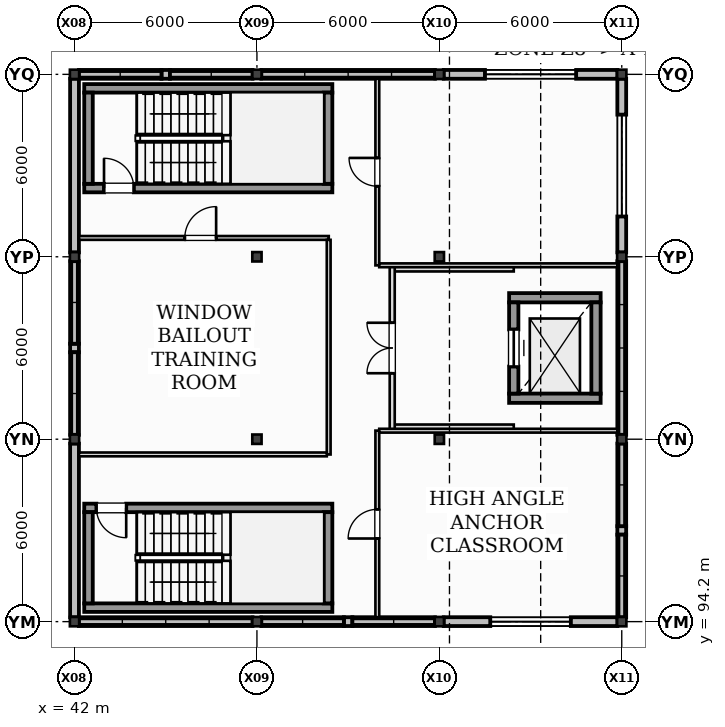
"""IFC4 building model, lengths in metres.
Left out: names, types, materials, properties, quantities, classifications, styles, units other than length and angle.
Written with IfcOpenShell. Run it as: python <this file> out.ifc"""

import sys

from ifc_helpers import new_model, si_unit, direction, frame, frame_2d, origin, origin_2d, place, context, subcontext, project, spatial, rectangle, i_section, extrude, element, fill, save


model = new_model("IFC4")
c1 = context("Model", 3, precision=1e-05, world=origin(), true_north=direction((0.0, 1.0)))
c2 = subcontext(c1, "Body", "Model", "MODEL_VIEW")
j1 = project(units=[si_unit("LENGTHUNIT", "METRE"), si_unit("PLANEANGLEUNIT", "RADIAN")], contexts=[c1])
p1 = place(None, origin())
s1 = spatial("IfcSite", under=j1, at=p1, CompositionType="ELEMENT")
p2 = place(p1, origin())
s2 = spatial("IfcBuilding", under=s1, at=p2, CompositionType="ELEMENT")
p3 = place(p2, frame((0.0, 0.0, 18.0)))
s3 = spatial("IfcBuildingStorey", under=s2, at=p3, CompositionType="ELEMENT", Elevation=18.0)
for number, where, z_axis, x_axis in (
    (1, (42.0, 94.2, 0.0), (0.0, 0.0, 1.0), (1.0, 0.0, 0.0)),
    (2, (42.0, 100.2, 0.0), (0.0, 0.0, 1.0), (1.0, 0.0, 0.0)),
    (3, (42.0, 106.2, 0.0), (0.0, 0.0, 1.0), (1.0, 0.0, 0.0)),
    (4, (42.0, 112.2, 0.0), (0.0, 0.0, 1.0), (1.0, 0.0, 0.0)),
    (5, (48.0, 94.2, 0.0), (0.0, 0.0, 1.0), (1.0, 0.0, 0.0)),
    (6, (48.0, 100.2, 0.0), (0.0, 0.0, 1.0), (1.0, 0.0, 0.0)),
    (7, (48.0, 106.2, 0.0), (0.0, 0.0, 1.0), (1.0, 0.0, 0.0)),
    (8, (48.0, 112.2, 0.0), (0.0, 0.0, 1.0), (1.0, 0.0, 0.0)),
    (9, (54.0, 94.2, 0.0), (0.0, 0.0, 1.0), (1.0, 0.0, 0.0)),
    (10, (54.0, 100.2, 0.0), (0.0, 0.0, 1.0), (1.0, 0.0, 0.0)),
    (11, (54.0, 106.2, 0.0), (0.0, 0.0, 1.0), (1.0, 0.0, 0.0)),
    (12, (54.0, 112.2, 0.0), (0.0, 0.0, 1.0), (1.0, 0.0, 0.0)),
    (13, (60.0, 94.2, 0.0), (0.0, 0.0, 1.0), (1.0, 0.0, 0.0)),
    (14, (60.0, 100.2, 0.0), (0.0, 0.0, 1.0), (1.0, 0.0, 0.0)),
    (15, (60.0, 106.2, 0.0), (0.0, 0.0, 1.0), (1.0, 0.0, 0.0)),
    (16, (60.0, 112.2, 0.0), (0.0, 0.0, 1.0), (1.0, 0.0, 0.0)),
):
    element("IfcColumn", number, at=place(p3, frame(where, z_axis=z_axis, x_axis=x_axis)), inside=s3, PredefinedType="COLUMN", context=c2, shape_type="SweptSolid", body=[
        extrude(i_section(OverallWidth=0.305, OverallDepth=0.308, WebThickness=0.01, FlangeThickness=0.015, at=origin_2d()), origin(), (0.0, 0.0, 1.0), 3.6),
    ])
p4 = place(p3, frame((42.145, 94.2, 0.0), z_axis=(0.0, 0.0, 1.0), x_axis=(1.0, 0.0, 0.0)))
e17 = element("IfcWall", 17, at=p4, inside=s3, PredefinedType="STANDARD", context=c2, shape_type="SweptSolid", body=[
    extrude(rectangle(XDim=5.71, YDim=0.29, at=frame_2d((2.855, 0.0))), origin(), (0.0, 0.0, 1.0), 0.44),
])
p5 = place(p3, frame((50.86, 94.2, 0.0), z_axis=(0.0, 0.0, 1.0), x_axis=(1.0, 0.0, 0.0)))
e18 = element("IfcWall", 18, at=p5, inside=s3, PredefinedType="STANDARD", context=c2, shape_type="SweptSolid", body=[
    extrude(rectangle(XDim=0.28, YDim=0.29, at=frame_2d((0.14, 0.0))), origin(), (0.0, 0.0, 1.0), 2.869),
])
p6 = place(p3, frame((48.145, 94.2, 0.0), z_axis=(0.0, 0.0, 1.0), x_axis=(1.0, 0.0, 0.0)))
e19 = element("IfcWall", 19, at=p6, inside=s3, PredefinedType="STANDARD", context=c2, shape_type="SweptSolid", body=[
    extrude(rectangle(XDim=2.715, YDim=0.29, at=frame_2d((1.357, 0.0))), origin(), (0.0, 0.0, 1.0), 0.56),
])
p7 = place(p3, frame((51.14, 94.2, 0.0), z_axis=(0.0, 0.0, 1.0), x_axis=(1.0, 0.0, 0.0)))
e20 = element("IfcWall", 20, at=p7, inside=s3, PredefinedType="STANDARD", context=c2, shape_type="SweptSolid", body=[
    extrude(rectangle(XDim=2.715, YDim=0.29, at=frame_2d((1.357, 0.0))), origin(), (0.0, 0.0, 1.0), 0.68),
])
p8 = place(p3, frame((54.145, 94.2, 0.0), z_axis=(0.0, 0.0, 1.0), x_axis=(1.0, 0.0, 0.0)))
e21 = element("IfcWall", 21, at=p8, inside=s3, PredefinedType="STANDARD", context=c2, shape_type="SweptSolid", body=[
    extrude(rectangle(XDim=5.71, YDim=0.29, at=frame_2d((2.855, 0.0))), origin(), (0.0, 0.0, 1.0), 2.869),
])
p9 = place(p8, frame((1.53, 0.0, 1.0)))
e22 = element("IfcOpeningElement", 22, at=p9, cuts=e21, PredefinedType="OPENING", context=c2, shape_type="SweptSolid", body=[
    extrude(rectangle(XDim=2.65, YDim=0.88, at=frame_2d((1.325, 0.44))), frame((0.0, 0.155, 0.0), z_axis=(0.0, -1.0, 0.0), x_axis=(1.0, 0.0, 0.0)), (0.0, 0.0, 1.0), 0.31),
])
p10 = place(p3, frame((45.14, 112.2, 0.0), z_axis=(0.0, 0.0, 1.0), x_axis=(-1.0, 0.0, 0.0)))
e23 = element("IfcWall", 23, at=p10, inside=s3, PredefinedType="STANDARD", context=c2, shape_type="SweptSolid", body=[
    extrude(rectangle(XDim=0.28, YDim=0.29, at=frame_2d((0.14, 0.0))), origin(), (0.0, 0.0, 1.0), 2.869),
])
p11 = place(p3, frame((47.855, 112.2, 0.0), z_axis=(0.0, 0.0, 1.0), x_axis=(-1.0, 0.0, 0.0)))
e24 = element("IfcWall", 24, at=p11, inside=s3, PredefinedType="STANDARD", context=c2, shape_type="SweptSolid", body=[
    extrude(rectangle(XDim=2.715, YDim=0.29, at=frame_2d((1.357, 0.0))), origin(), (0.0, 0.0, 1.0), 0.8),
])
p12 = place(p3, frame((44.86, 112.2, 0.0), z_axis=(0.0, 0.0, 1.0), x_axis=(-1.0, 0.0, 0.0)))
e25 = element("IfcWall", 25, at=p12, inside=s3, PredefinedType="STANDARD", context=c2, shape_type="SweptSolid", body=[
    extrude(rectangle(XDim=2.715, YDim=0.29, at=frame_2d((1.357, 0.0))), origin(), (0.0, 0.0, 1.0), 0.92),
])
p13 = place(p3, frame((53.855, 112.2, 0.0), z_axis=(0.0, 0.0, 1.0), x_axis=(-1.0, 0.0, 0.0)))
e26 = element("IfcWall", 26, at=p13, inside=s3, PredefinedType="STANDARD", context=c2, shape_type="SweptSolid", body=[
    extrude(rectangle(XDim=5.71, YDim=0.29, at=frame_2d((2.855, 0.0))), origin(), (0.0, 0.0, 1.0), 0.32),
])
p14 = place(p3, frame((59.855, 112.2, 0.0), z_axis=(0.0, 0.0, 1.0), x_axis=(-1.0, 0.0, 0.0)))
e27 = element("IfcWall", 27, at=p14, inside=s3, PredefinedType="STANDARD", context=c2, shape_type="SweptSolid", body=[
    extrude(rectangle(XDim=5.71, YDim=0.29, at=frame_2d((2.855, 0.0))), origin(), (0.0, 0.0, 1.0), 2.869),
])
p15 = place(p14, frame((1.355, 0.0, 1.0)))
e28 = element("IfcOpeningElement", 28, at=p15, cuts=e27, PredefinedType="OPENING", context=c2, shape_type="SweptSolid", body=[
    extrude(rectangle(XDim=3.0, YDim=0.88, at=frame_2d((1.5, 0.44))), frame((0.0, 0.155, 0.0), z_axis=(0.0, -1.0, 0.0), x_axis=(1.0, 0.0, 0.0)), (0.0, 0.0, 1.0), 0.31),
])
p16 = place(p3, frame((42.0, 100.055, 0.0), z_axis=(0.0, 0.0, 1.0), x_axis=(0.0, -1.0, 0.0)))
e29 = element("IfcWall", 29, at=p16, inside=s3, PredefinedType="STANDARD", context=c2, shape_type="SweptSolid", body=[
    extrude(rectangle(XDim=5.71, YDim=0.29, at=frame_2d((2.855, 0.0))), origin(), (0.0, 0.0, 1.0), 2.873),
])
p17 = place(p3, frame((42.0, 103.34, 0.0), z_axis=(0.0, 0.0, 1.0), x_axis=(0.0, -1.0, 0.0)))
e30 = element("IfcWall", 30, at=p17, inside=s3, PredefinedType="STANDARD", context=c2, shape_type="SweptSolid", body=[
    extrude(rectangle(XDim=0.28, YDim=0.29, at=frame_2d((0.14, 0.0))), origin(), (0.0, 0.0, 1.0), 2.873),
])
p18 = place(p3, frame((42.0, 106.055, 0.0), z_axis=(0.0, 0.0, 1.0), x_axis=(0.0, -1.0, 0.0)))
e31 = element("IfcWall", 31, at=p18, inside=s3, PredefinedType="STANDARD", context=c2, shape_type="SweptSolid", body=[
    extrude(rectangle(XDim=2.715, YDim=0.29, at=frame_2d((1.357, 0.0))), origin(), (0.0, 0.0, 1.0), 0.44),
])
p19 = place(p3, frame((42.0, 103.06, 0.0), z_axis=(0.0, 0.0, 1.0), x_axis=(0.0, -1.0, 0.0)))
e32 = element("IfcWall", 32, at=p19, inside=s3, PredefinedType="STANDARD", context=c2, shape_type="SweptSolid", body=[
    extrude(rectangle(XDim=2.715, YDim=0.29, at=frame_2d((1.357, 0.0))), origin(), (0.0, 0.0, 1.0), 0.56),
])
p20 = place(p3, frame((42.0, 112.055, 0.0), z_axis=(0.0, 0.0, 1.0), x_axis=(0.0, -1.0, 0.0)))
e33 = element("IfcWall", 33, at=p20, inside=s3, PredefinedType="STANDARD", context=c2, shape_type="SweptSolid", body=[
    extrude(rectangle(XDim=5.71, YDim=0.29, at=frame_2d((2.855, 0.0))), origin(), (0.0, 0.0, 1.0), 2.873),
])
p21 = place(p3, frame((60.0, 97.06, 0.0), z_axis=(0.0, 0.0, 1.0), x_axis=(0.0, 1.0, 0.0)))
e34 = element("IfcWall", 34, at=p21, inside=s3, PredefinedType="STANDARD", context=c2, shape_type="SweptSolid", body=[
    extrude(rectangle(XDim=0.28, YDim=0.29, at=frame_2d((0.14, 0.0))), origin(), (0.0, 0.0, 1.0), 2.873),
])
p22 = place(p3, frame((60.0, 94.345, 0.0), z_axis=(0.0, 0.0, 1.0), x_axis=(0.0, 1.0, 0.0)))
e35 = element("IfcWall", 35, at=p22, inside=s3, PredefinedType="STANDARD", context=c2, shape_type="SweptSolid", body=[
    extrude(rectangle(XDim=2.715, YDim=0.29, at=frame_2d((1.357, 0.0))), origin(), (0.0, 0.0, 1.0), 0.68),
])
p23 = place(p3, frame((60.0, 97.34, 0.0), z_axis=(0.0, 0.0, 1.0), x_axis=(0.0, 1.0, 0.0)))
e36 = element("IfcWall", 36, at=p23, inside=s3, PredefinedType="STANDARD", context=c2, shape_type="SweptSolid", body=[
    extrude(rectangle(XDim=2.715, YDim=0.29, at=frame_2d((1.357, 0.0))), origin(), (0.0, 0.0, 1.0), 0.8),
])
p24 = place(p3, frame((60.0, 100.345, 0.0), z_axis=(0.0, 0.0, 1.0), x_axis=(0.0, 1.0, 0.0)))
e37 = element("IfcWall", 37, at=p24, inside=s3, PredefinedType="STANDARD", context=c2, shape_type="SweptSolid", body=[
    extrude(rectangle(XDim=5.71, YDim=0.29, at=frame_2d((2.855, 0.0))), origin(), (0.0, 0.0, 1.0), 0.92),
])
p25 = place(p3, frame((60.0, 106.345, 0.0), z_axis=(0.0, 0.0, 1.0), x_axis=(0.0, 1.0, 0.0)))
e38 = element("IfcWall", 38, at=p25, inside=s3, PredefinedType="STANDARD", context=c2, shape_type="SweptSolid", body=[
    extrude(rectangle(XDim=5.71, YDim=0.29, at=frame_2d((2.855, 0.0))), origin(), (0.0, 0.0, 1.0), 2.873),
])
p26 = place(p25, frame((1.18, 0.0, 1.0)))
e39 = element("IfcOpeningElement", 39, at=p26, cuts=e38, PredefinedType="OPENING", context=c2, shape_type="SweptSolid", body=[
    extrude(rectangle(XDim=3.35, YDim=0.88, at=frame_2d((1.675, 0.44))), frame((0.0, 0.155, 0.0), z_axis=(0.0, -1.0, 0.0), x_axis=(1.0, 0.0, 0.0)), (0.0, 0.0, 1.0), 0.31),
])
p27 = place(p3, frame((42.32, 94.66, 0.0), z_axis=(0.0, 0.0, 1.0), x_axis=(1.0, 0.0, 0.0)))
e40 = element("IfcWall", 40, at=p27, inside=s3, PredefinedType="SHEAR", context=c2, shape_type="SweptSolid", body=[
    extrude(rectangle(XDim=8.16, YDim=0.28, at=frame_2d((4.08, 0.0))), origin(), (0.0, 0.0, 1.0), 3.6),
])
p28 = place(p3, frame((50.48, 97.94, 0.0), z_axis=(0.0, 0.0, 1.0), x_axis=(-1.0, 0.0, 0.0)))
e41 = element("IfcWall", 41, at=p28, inside=s3, PredefinedType="SHEAR", context=c2, shape_type="SweptSolid", body=[
    extrude(rectangle(XDim=8.16, YDim=0.28, at=frame_2d((4.08, 0.0))), origin(), (0.0, 0.0, 1.0), 3.6),
])
p29 = place(p28, frame((6.78, 0.0, 0.0)))
e42 = element("IfcOpeningElement", 42, at=p29, cuts=e41, PredefinedType="OPENING", context=c2, shape_type="SweptSolid", body=[
    extrude(rectangle(XDim=0.98, YDim=2.15, at=frame_2d((0.49, 1.075))), frame((0.0, 0.15, 0.0), z_axis=(0.0, -1.0, 0.0), x_axis=(1.0, 0.0, 0.0)), (0.0, 0.0, 1.0), 0.3),
])
for number, where, z_axis, x_axis in (
    (43, (42.46, 97.8, 0.0), (0.0, 0.0, 1.0), (0.0, -1.0, 0.0)),
    (44, (50.34, 94.8, 0.0), (0.0, 0.0, 1.0), (0.0, 1.0, 0.0)),
):
    element("IfcWall", number, at=place(p3, frame(where, z_axis=z_axis, x_axis=x_axis)), inside=s3, PredefinedType="SHEAR", context=c2, shape_type="SweptSolid", body=[
        extrude(rectangle(XDim=3.0, YDim=0.28, at=frame_2d((1.5, 0.0))), origin(), (0.0, 0.0, 1.0), 3.6),
    ])
p30 = place(p3, frame((42.32, 108.46, 0.0), z_axis=(0.0, 0.0, 1.0), x_axis=(1.0, 0.0, 0.0)))
e45 = element("IfcWall", 45, at=p30, inside=s3, PredefinedType="SHEAR", context=c2, shape_type="SweptSolid", body=[
    extrude(rectangle(XDim=8.16, YDim=0.28, at=frame_2d((4.08, 0.0))), origin(), (0.0, 0.0, 1.0), 3.6),
])
p31 = place(p30, frame((0.65, 0.0, 0.0)))
e46 = element("IfcOpeningElement", 46, at=p31, cuts=e45, PredefinedType="OPENING", context=c2, shape_type="SweptSolid", body=[
    extrude(rectangle(XDim=0.98, YDim=2.15, at=frame_2d((0.49, 1.075))), frame((0.0, 0.15, 0.0), z_axis=(0.0, -1.0, 0.0), x_axis=(1.0, 0.0, 0.0)), (0.0, 0.0, 1.0), 0.3),
])
p32 = place(p3, frame((50.48, 111.74, 0.0), z_axis=(0.0, 0.0, 1.0), x_axis=(-1.0, 0.0, 0.0)))
e47 = element("IfcWall", 47, at=p32, inside=s3, PredefinedType="SHEAR", context=c2, shape_type="SweptSolid", body=[
    extrude(rectangle(XDim=8.16, YDim=0.28, at=frame_2d((4.08, 0.0))), origin(), (0.0, 0.0, 1.0), 3.6),
])
for number, where, z_axis, x_axis in (
    (48, (42.46, 111.6, 0.0), (0.0, 0.0, 1.0), (0.0, -1.0, 0.0)),
    (49, (50.34, 108.6, 0.0), (0.0, 0.0, 1.0), (0.0, 1.0, 0.0)),
):
    element("IfcWall", number, at=place(p3, frame(where, z_axis=z_axis, x_axis=x_axis)), inside=s3, PredefinedType="SHEAR", context=c2, shape_type="SweptSolid", body=[
        extrude(rectangle(XDim=3.0, YDim=0.28, at=frame_2d((1.5, 0.0))), origin(), (0.0, 0.0, 1.0), 3.6),
    ])
for number, where, z_axis, x_axis in (
    (50, (56.295, 101.548, 0.0), (0.0, 0.0, 1.0), (1.0, 0.0, 0.0)),
    (51, (59.305, 104.853, 0.0), (0.0, 0.0, 1.0), (-1.0, 0.0, 0.0)),
):
    element("IfcWall", number, at=place(p3, frame(where, z_axis=z_axis, x_axis=x_axis)), inside=s3, PredefinedType="SHEAR", context=c2, shape_type="SweptSolid", body=[
        extrude(rectangle(XDim=3.01, YDim=0.305, at=frame_2d((1.505, 0.0))), origin(), (0.0, 0.0, 1.0), 3.6),
    ])
p33 = place(p3, frame((56.448, 104.7, 0.0), z_axis=(0.0, 0.0, 1.0), x_axis=(0.0, -1.0, 0.0)))
e52 = element("IfcWall", 52, at=p33, inside=s3, PredefinedType="SHEAR", context=c2, shape_type="SweptSolid", body=[
    extrude(rectangle(XDim=3.0, YDim=0.305, at=frame_2d((1.5, 0.0))), origin(), (0.0, 0.0, 1.0), 3.6),
])
p34 = place(p33, frame((0.89, 0.0, 0.0)))
e53 = element("IfcOpeningElement", 53, at=p34, cuts=e52, PredefinedType="OPENING", context=c2, shape_type="SweptSolid", body=[
    extrude(rectangle(XDim=1.22, YDim=2.22, at=frame_2d((0.61, 1.11))), frame((0.0, 0.162, 0.0), z_axis=(0.0, -1.0, 0.0), x_axis=(1.0, 0.0, 0.0)), (0.0, 0.0, 1.0), 0.325),
])
p35 = place(p3, frame((59.153, 101.7, 0.0), z_axis=(0.0, 0.0, 1.0), x_axis=(0.0, 1.0, 0.0)))
e54 = element("IfcWall", 54, at=p35, inside=s3, PredefinedType="SHEAR", context=c2, shape_type="SweptSolid", body=[
    extrude(rectangle(XDim=3.0, YDim=0.305, at=frame_2d((1.5, 0.0))), origin(), (0.0, 0.0, 1.0), 3.6),
])
for number, where, z_axis, x_axis in (
    (55, (52.45, 100.6, 0.0), (0.0, 0.0, 1.0), (1.0, 0.0, 0.0)),
    (56, (56.448, 105.8, 0.0), (0.0, 0.0, 1.0), (-1.0, 0.0, 0.0)),
):
    element("IfcWall", number, at=place(p3, frame(where, z_axis=z_axis, x_axis=x_axis)), inside=s3, PredefinedType="PARTITIONING", context=c2, shape_type="SweptSolid", body=[
        extrude(rectangle(XDim=3.998, YDim=0.165, at=frame_2d((1.999, 0.0))), origin(), (0.0, 0.0, 1.0), 3.36),
    ])
p36 = place(p3, frame((52.45, 100.52, 0.0), z_axis=(0.0, 0.0, 1.0), x_axis=(0.0, 1.0, 0.0)))
e57 = element("IfcWall", 57, at=p36, inside=s3, PredefinedType="PARTITIONING", context=c2, shape_type="SweptSolid", body=[
    extrude(rectangle(XDim=5.36, YDim=0.165, at=frame_2d((2.68, 0.0))), origin(), (0.0, 0.0, 1.0), 3.36),
])
p37 = place(p36, frame((1.85, 0.0, 0.0)))
e58 = element("IfcOpeningElement", 58, at=p37, cuts=e57, PredefinedType="OPENING", context=c2, shape_type="SweptSolid", body=[
    extrude(rectangle(XDim=1.66, YDim=2.2, at=frame_2d((0.83, 1.1))), frame((0.0, 0.093, 0.0), z_axis=(0.0, -1.0, 0.0), x_axis=(1.0, 0.0, 0.0)), (0.0, 0.0, 1.0), 0.185),
])
p38 = place(p3, frame((42.145, 106.82, 0.0), z_axis=(0.0, 0.0, 1.0), x_axis=(1.0, 0.0, 0.0)))
e59 = element("IfcWall", 59, at=p38, inside=s3, PredefinedType="PARTITIONING", context=c2, shape_type="SweptSolid", body=[
    extrude(rectangle(XDim=8.218, YDim=0.125, at=frame_2d((4.109, 0.0))), origin(), (0.0, 0.0, 1.0), 3.36),
])
p39 = place(p38, frame((3.483, 0.0, 0.0)))
e60 = element("IfcOpeningElement", 60, at=p39, cuts=e59, PredefinedType="OPENING", context=c2, shape_type="SweptSolid", body=[
    extrude(rectangle(XDim=1.03, YDim=2.15, at=frame_2d((0.515, 1.075))), frame((0.0, 0.073, 0.0), z_axis=(0.0, -1.0, 0.0), x_axis=(1.0, 0.0, 0.0)), (0.0, 0.0, 1.0), 0.145),
])
p40 = place(p3, frame((50.36, 106.758, 0.0), z_axis=(0.0, 0.0, 1.0), x_axis=(0.0, -1.0, 0.0)))
e61 = element("IfcWall", 61, at=p40, inside=s3, PredefinedType="PARTITIONING", context=c2, shape_type="SweptSolid", body=[
    extrude(rectangle(XDim=7.06, YDim=0.125, at=frame_2d((3.53, 0.0))), origin(), (0.0, 0.0, 1.0), 3.36),
])
p41 = place(p3, frame((50.298, 99.7, 0.0), z_axis=(0.0, 0.0, 1.0), x_axis=(-1.0, 0.0, 0.0)))
e62 = element("IfcWall", 62, at=p41, inside=s3, PredefinedType="PARTITIONING", context=c2, shape_type="SweptSolid", body=[
    extrude(rectangle(XDim=8.153, YDim=0.125, at=frame_2d((4.076, 0.0))), origin(), (0.0, 0.0, 1.0), 3.36),
])
p42 = place(p3, frame((51.96, 94.345, 0.0), z_axis=(0.0, 0.0, 1.0), x_axis=(0.0, 1.0, 0.0)))
e63 = element("IfcWall", 63, at=p42, inside=s3, PredefinedType="PARTITIONING", context=c2, shape_type="SweptSolid", body=[
    extrude(rectangle(XDim=6.137, YDim=0.125, at=frame_2d((3.069, 0.0))), origin(), (0.0, 0.0, 1.0), 3.019),
])
p43 = place(p42, frame((2.589, 0.0, 0.0)))
e64 = element("IfcOpeningElement", 64, at=p43, cuts=e63, PredefinedType="OPENING", context=c2, shape_type="SweptSolid", body=[
    extrude(rectangle(XDim=0.96, YDim=2.15, at=frame_2d((0.48, 1.075))), frame((0.0, 0.073, 0.0), z_axis=(0.0, -1.0, 0.0), x_axis=(1.0, 0.0, 0.0)), (0.0, 0.0, 1.0), 0.145),
])
p44 = place(p3, frame((52.022, 100.48, 0.0), z_axis=(0.0, 0.0, 1.0), x_axis=(1.0, 0.0, 0.0)))
e65 = element("IfcWall", 65, at=p44, inside=s3, PredefinedType="PARTITIONING", context=c2, shape_type="SweptSolid", body=[
    extrude(rectangle(XDim=7.833, YDim=0.125, at=frame_2d((3.916, 0.0))), origin(), (0.0, 0.0, 1.0), 2.869),
])
p45 = place(p3, frame((51.96, 105.917, 0.0), z_axis=(0.0, 0.0, 1.0), x_axis=(0.0, 1.0, 0.0)))
e66 = element("IfcWall", 66, at=p45, inside=s3, PredefinedType="PARTITIONING", context=c2, shape_type="SweptSolid", body=[
    extrude(rectangle(XDim=6.137, YDim=0.125, at=frame_2d((3.069, 0.0))), origin(), (0.0, 0.0, 1.0), 3.019),
])
p46 = place(p45, frame((2.604, 0.0, 0.0)))
e67 = element("IfcOpeningElement", 67, at=p46, cuts=e66, PredefinedType="OPENING", context=c2, shape_type="SweptSolid", body=[
    extrude(rectangle(XDim=0.93, YDim=2.1, at=frame_2d((0.465, 1.05))), frame((0.0, 0.073, 0.0), z_axis=(0.0, -1.0, 0.0), x_axis=(1.0, 0.0, 0.0)), (0.0, 0.0, 1.0), 0.145),
])
p47 = place(p3, frame((59.855, 105.92, 0.0), z_axis=(0.0, 0.0, 1.0), x_axis=(-1.0, 0.0, 0.0)))
e68 = element("IfcWall", 68, at=p47, inside=s3, PredefinedType="PARTITIONING", context=c2, shape_type="SweptSolid", body=[
    extrude(rectangle(XDim=7.833, YDim=0.125, at=frame_2d((3.916, 0.0))), origin(), (0.0, 0.0, 1.0), 2.869),
])
p48 = place(p9, origin())
e69 = element("IfcWindow", 69, at=p48, inside=s3, PartitioningType="SINGLE_PANEL", PredefinedType="WINDOW", context=c2, shape_type="SweptSolid", body=[
    extrude(rectangle(XDim=2.65, YDim=0.88, at=frame_2d((1.325, 0.44))), frame((0.0, 0.03, 0.0), z_axis=(0.0, -1.0, 0.0), x_axis=(1.0, 0.0, 0.0)), (0.0, 0.0, 1.0), 0.06),
])
fill(e22, e69)
p49 = place(p15, origin())
e70 = element("IfcWindow", 70, at=p49, inside=s3, PartitioningType="SINGLE_PANEL", PredefinedType="WINDOW", context=c2, shape_type="SweptSolid", body=[
    extrude(rectangle(XDim=3.0, YDim=0.88, at=frame_2d((1.5, 0.44))), frame((0.0, 0.03, 0.0), z_axis=(0.0, -1.0, 0.0), x_axis=(1.0, 0.0, 0.0)), (0.0, 0.0, 1.0), 0.06),
])
fill(e28, e70)
p50 = place(p26, origin())
e71 = element("IfcWindow", 71, at=p50, inside=s3, PartitioningType="SINGLE_PANEL", PredefinedType="WINDOW", context=c2, shape_type="SweptSolid", body=[
    extrude(rectangle(XDim=3.35, YDim=0.88, at=frame_2d((1.675, 0.44))), frame((0.0, 0.03, 0.0), z_axis=(0.0, -1.0, 0.0), x_axis=(1.0, 0.0, 0.0)), (0.0, 0.0, 1.0), 0.06),
])
fill(e39, e71)
p51 = place(p29, origin())
e72 = element("IfcDoor", 72, at=p51, inside=s3, OperationType="SINGLE_SWING_LEFT", PredefinedType="DOOR", context=c2, shape_type="SweptSolid", body=[
    extrude(rectangle(XDim=0.98, YDim=2.15, at=frame_2d((0.49, 1.075))), frame((0.0, 0.025, 0.0), z_axis=(0.0, -1.0, 0.0), x_axis=(1.0, 0.0, 0.0)), (0.0, 0.0, 1.0), 0.05),
])
fill(e42, e72)
p52 = place(p31, origin())
e73 = element("IfcDoor", 73, at=p52, inside=s3, OperationType="SINGLE_SWING_LEFT", PredefinedType="DOOR", context=c2, shape_type="SweptSolid", body=[
    extrude(rectangle(XDim=0.98, YDim=2.15, at=frame_2d((0.49, 1.075))), frame((0.0, 0.025, 0.0), z_axis=(0.0, -1.0, 0.0), x_axis=(1.0, 0.0, 0.0)), (0.0, 0.0, 1.0), 0.05),
])
fill(e46, e73)
p53 = place(p34, origin())
e74 = element("IfcDoor", 74, at=p53, inside=s3, OperationType="SLIDING_TO_LEFT", PredefinedType="DOOR", context=c2, shape_type="SweptSolid", body=[
    extrude(rectangle(XDim=1.22, YDim=2.22, at=frame_2d((0.61, 1.11))), frame((0.0, 0.025, 0.0), z_axis=(0.0, -1.0, 0.0), x_axis=(1.0, 0.0, 0.0)), (0.0, 0.0, 1.0), 0.05),
])
fill(e53, e74)
p54 = place(p37, frame((1.66, 0.0, 0.0), z_axis=(0.0, 0.0, 1.0), x_axis=(-1.0, 0.0, 0.0)))
e75 = element("IfcDoor", 75, at=p54, inside=s3, OperationType="DOUBLE_DOOR_SINGLE_SWING", PredefinedType="DOOR", context=c2, shape_type="SweptSolid", body=[
    extrude(rectangle(XDim=1.66, YDim=2.2, at=frame_2d((0.83, 1.1))), frame((0.0, 0.025, 0.0), z_axis=(0.0, -1.0, 0.0), x_axis=(1.0, 0.0, 0.0)), (0.0, 0.0, 1.0), 0.05),
])
fill(e58, e75)
p55 = place(p39, frame((1.03, 0.0, 0.0), z_axis=(0.0, 0.0, 1.0), x_axis=(-1.0, 0.0, 0.0)))
e76 = element("IfcDoor", 76, at=p55, inside=s3, OperationType="SINGLE_SWING_RIGHT", PredefinedType="DOOR", context=c2, shape_type="SweptSolid", body=[
    extrude(rectangle(XDim=1.03, YDim=2.15, at=frame_2d((0.515, 1.075))), frame((0.0, 0.025, 0.0), z_axis=(0.0, -1.0, 0.0), x_axis=(1.0, 0.0, 0.0)), (0.0, 0.0, 1.0), 0.05),
])
fill(e60, e76)
p56 = place(p43, frame((0.96, 0.0, 0.0), z_axis=(0.0, 0.0, 1.0), x_axis=(-1.0, 0.0, 0.0)))
e77 = element("IfcDoor", 77, at=p56, inside=s3, OperationType="SINGLE_SWING_LEFT", PredefinedType="DOOR", context=c2, shape_type="SweptSolid", body=[
    extrude(rectangle(XDim=0.96, YDim=2.15, at=frame_2d((0.48, 1.075))), frame((0.0, 0.025, 0.0), z_axis=(0.0, -1.0, 0.0), x_axis=(1.0, 0.0, 0.0)), (0.0, 0.0, 1.0), 0.05),
])
fill(e64, e77)
p57 = place(p46, frame((0.93, 0.0, 0.0), z_axis=(0.0, 0.0, 1.0), x_axis=(-1.0, 0.0, 0.0)))
e78 = element("IfcDoor", 78, at=p57, inside=s3, OperationType="SINGLE_SWING_RIGHT", PredefinedType="DOOR", context=c2, shape_type="SweptSolid", body=[
    extrude(rectangle(XDim=0.93, YDim=2.1, at=frame_2d((0.465, 1.05))), frame((0.0, 0.025, 0.0), z_axis=(0.0, -1.0, 0.0), x_axis=(1.0, 0.0, 0.0)), (0.0, 0.0, 1.0), 0.05),
])
fill(e67, e78)
save(model, sys.argv[1])
